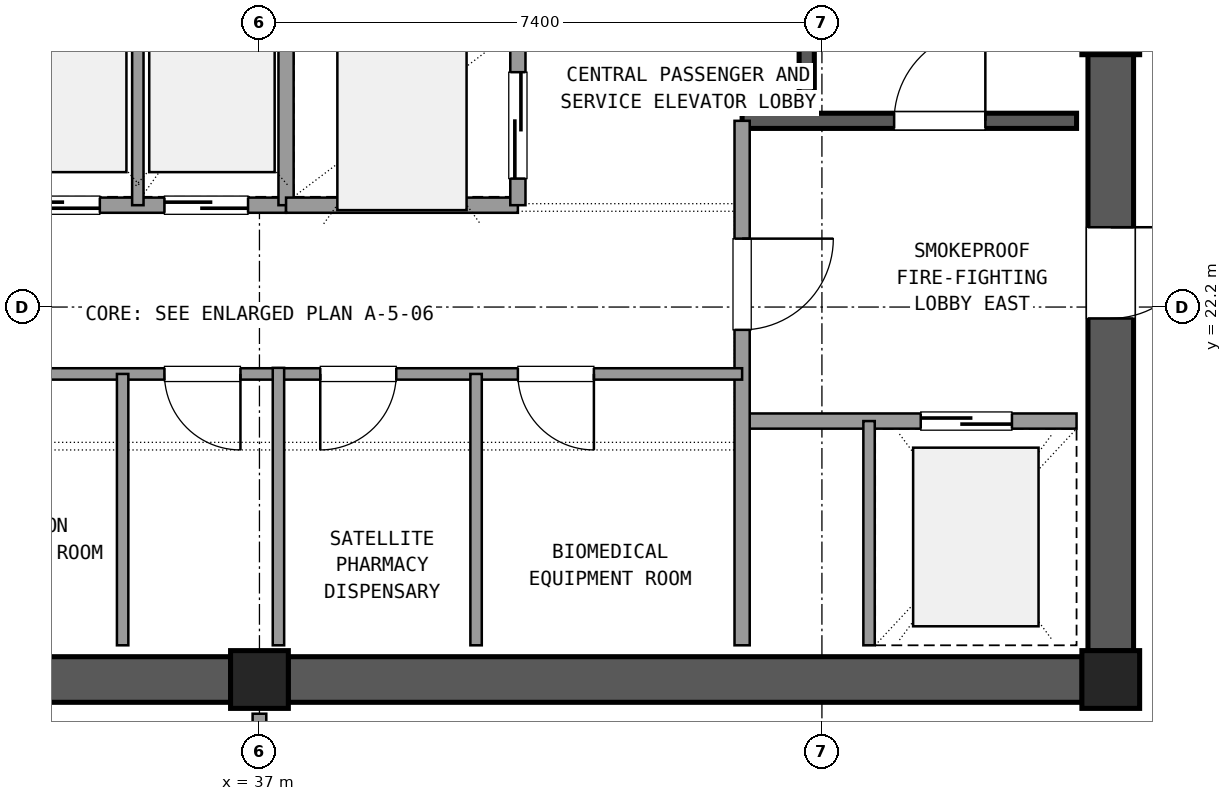
"""IFC4 building model, lengths in metres.
Left out: names, types, materials, properties, quantities, classifications, styles, units other than length and angle.
Written with IfcOpenShell. Run it as: python <this file> out.ifc"""

import sys

from ifc_helpers import new_model, si_unit, direction, frame, frame_2d, origin, origin_2d, place, context, subcontext, project, spatial, rectangle, extrude, element, fill, save


model = new_model("IFC4")
c1 = context("Model", 3, precision=1e-05, world=origin(), true_north=direction((0.0, 1.0)))
c2 = subcontext(c1, "Body", "Model", "MODEL_VIEW")
j1 = project(units=[si_unit("LENGTHUNIT", "METRE"), si_unit("PLANEANGLEUNIT", "RADIAN")], contexts=[c1])
p1 = place(None, origin())
s1 = spatial("IfcSite", under=j1, at=p1, CompositionType="ELEMENT")
p2 = place(p1, origin())
s2 = spatial("IfcBuilding", under=s1, at=p2, CompositionType="ELEMENT")
p3 = place(p2, frame((0.0, 0.0, 257.22)))
s3 = spatial("IfcBuildingStorey", under=s2, at=p3, CompositionType="ELEMENT", Elevation=257.22)
for number, where, z_axis, x_axis in (
    (1, (37.0, 17.3, 0.0), (0.0, 0.0, 1.0), (1.0, 0.0, 0.0)),
    (2, (48.2, 17.3, 0.0), (0.0, 0.0, 1.0), (1.0, 0.0, 0.0)),
    (3, (48.2, 25.9, 0.0), (0.0, 0.0, 1.0), (1.0, 0.0, 0.0)),
):
    element("IfcColumn", number, at=place(p3, frame(where, z_axis=z_axis, x_axis=x_axis)), inside=s3, PredefinedType="COLUMN", context=c2, shape_type="SweptSolid", body=[
        extrude(rectangle(XDim=0.76, YDim=0.76, at=origin_2d()), origin(), (0.0, 0.0, 1.0), 3.6),
    ])
for number, where, z_axis, x_axis in (
    (4, (26.175, 17.3, 0.0), (0.0, 0.0, 1.0), (1.0, 0.0, 0.0)),
    (5, (37.375, 17.3, 0.0), (0.0, 0.0, 1.0), (1.0, 0.0, 0.0)),
):
    element("IfcWall", number, at=place(p3, frame(where, z_axis=z_axis, x_axis=x_axis)), inside=s3, PredefinedType="SHEAR", context=c2, shape_type="SweptSolid", body=[
        extrude(rectangle(XDim=10.45, YDim=0.6, at=frame_2d((5.225, 0.0))), origin(), (0.0, 0.0, 1.0), 3.32),
    ])
p4 = place(p3, frame((48.2, 17.675, 0.0), z_axis=(0.0, 0.0, 1.0), x_axis=(0.0, 1.0, 0.0)))
e6 = element("IfcWall", 6, at=p4, inside=s3, PredefinedType="SHEAR", context=c2, shape_type="SweptSolid", body=[
    extrude(rectangle(XDim=7.85, YDim=0.6, at=frame_2d((3.925, 0.0))), origin(), (0.0, 0.0, 1.0), 3.32),
])
p5 = place(p4, frame((4.375, 0.0, 0.0)))
e7 = element("IfcOpeningElement", 7, at=p5, cuts=e6, PredefinedType="OPENING", context=c2, shape_type="SweptSolid", body=[
    extrude(rectangle(XDim=1.2, YDim=2.15, at=frame_2d((0.6, 1.075))), frame((0.0, 0.31, 0.0), z_axis=(0.0, -1.0, 0.0), x_axis=(1.0, 0.0, 0.0)), (0.0, 0.0, 1.0), 0.62),
])
p6 = place(p3, frame((44.2, 24.65, 0.0), z_axis=(0.0, 0.0, 1.0), x_axis=(0.0, 1.0, 0.0)))
e8 = element("IfcWall", 8, at=p6, inside=s3, PredefinedType="SHEAR", context=c2, shape_type="SweptSolid", body=[
    extrude(rectangle(XDim=9.4, YDim=0.2, at=frame_2d((4.7, 0.0))), origin(), (0.0, 0.0, 1.0), 3.32),
])
p7 = place(p3, frame((43.35, 24.65, 0.0), z_axis=(0.0, 0.0, 1.0), x_axis=(1.0, 0.0, 0.0)))
e9 = element("IfcWall", 9, at=p7, inside=s3, PredefinedType="SHEAR", context=c2, shape_type="SweptSolid", body=[
    extrude(rectangle(XDim=4.4, YDim=0.2, at=frame_2d((2.2, 0.0))), origin(), (0.0, 0.0, 1.0), 3.32),
])
p8 = place(p7, frame((2.0, 0.0, 0.0)))
e10 = element("IfcOpeningElement", 10, at=p8, cuts=e9, PredefinedType="OPENING", context=c2, shape_type="SweptSolid", body=[
    extrude(rectangle(XDim=1.2, YDim=2.15, at=frame_2d((0.6, 1.075))), frame((0.0, 0.11, 0.0), z_axis=(0.0, -1.0, 0.0), x_axis=(1.0, 0.0, 0.0)), (0.0, 0.0, 1.0), 0.22),
])
p9 = place(p3, frame((43.35, 20.7, 0.0), z_axis=(0.0, 0.0, 1.0), x_axis=(1.0, 0.0, 0.0)))
e11 = element("IfcWall", 11, at=p9, inside=s3, PredefinedType="SOLIDWALL", context=c2, shape_type="SweptSolid", body=[
    extrude(rectangle(XDim=4.4, YDim=0.2, at=frame_2d((2.2, 0.0))), origin(), (0.0, 0.0, 1.0), 2.61),
])
p10 = place(p9, frame((2.35, 0.0, 0.0)))
e12 = element("IfcOpeningElement", 12, at=p10, cuts=e11, PredefinedType="OPENING", context=c2, shape_type="SweptSolid", body=[
    extrude(rectangle(XDim=1.2, YDim=2.15, at=frame_2d((0.6, 1.075))), frame((0.0, 0.11, 0.0), z_axis=(0.0, -1.0, 0.0), x_axis=(1.0, 0.0, 0.0)), (0.0, 0.0, 1.0), 0.22),
])
p11 = place(p3, frame((43.35, 17.75, 0.0), z_axis=(0.0, 0.0, 1.0), x_axis=(0.0, 1.0, 0.0)))
e13 = element("IfcWall", 13, at=p11, inside=s3, PredefinedType="SOLIDWALL", context=c2, shape_type="SweptSolid", body=[
    extrude(rectangle(XDim=6.9, YDim=0.2, at=frame_2d((3.45, 0.0))), origin(), (0.0, 0.0, 1.0), 2.61),
])
p12 = place(p11, frame((4.15, 0.0, 0.0)))
e14 = element("IfcOpeningElement", 14, at=p12, cuts=e13, PredefinedType="OPENING", context=c2, shape_type="SweptSolid", body=[
    extrude(rectangle(XDim=1.2, YDim=2.15, at=frame_2d((0.6, 1.075))), frame((0.0, 0.11, 0.0), z_axis=(0.0, -1.0, 0.0), x_axis=(1.0, 0.0, 0.0)), (0.0, 0.0, 1.0), 0.22),
])
p13 = place(p3, frame((45.02, 17.75, 0.0), z_axis=(0.0, 0.0, 1.0), x_axis=(0.0, 1.0, 0.0)))
e15 = element("IfcWall", 15, at=p13, inside=s3, PredefinedType="PARTITIONING", context=c2, shape_type="SweptSolid", body=[
    extrude(rectangle(XDim=2.95, YDim=0.15, at=frame_2d((1.475, 0.0))), origin(), (0.0, 0.0, 1.0), 2.61),
])
p14 = place(p3, frame((30.25, 21.32, 0.0), z_axis=(0.0, 0.0, 1.0), x_axis=(1.0, 0.0, 0.0)))
e16 = element("IfcWall", 16, at=p14, inside=s3, PredefinedType="PARTITIONING", context=c2, shape_type="SweptSolid", body=[
    extrude(rectangle(XDim=7.0, YDim=0.15, at=frame_2d((3.5, 0.0))), origin(), (0.0, 0.0, 1.0), 2.61),
])
p15 = place(p14, frame((0.7, 0.0, 0.0)))
e17 = element("IfcOpeningElement", 17, at=p15, cuts=e16, PredefinedType="OPENING", context=c2, shape_type="SweptSolid", body=[
    extrude(rectangle(XDim=1.0, YDim=2.15, at=frame_2d((0.5, 1.075))), frame((0.0, 0.085, 0.0), z_axis=(0.0, -1.0, 0.0), x_axis=(1.0, 0.0, 0.0)), (0.0, 0.0, 1.0), 0.17),
])
p16 = place(p14, frame((5.5, 0.0, 0.0)))
e18 = element("IfcOpeningElement", 18, at=p16, cuts=e16, PredefinedType="OPENING", context=c2, shape_type="SweptSolid", body=[
    extrude(rectangle(XDim=1.0, YDim=2.15, at=frame_2d((0.5, 1.075))), frame((0.0, 0.085, 0.0), z_axis=(0.0, -1.0, 0.0), x_axis=(1.0, 0.0, 0.0)), (0.0, 0.0, 1.0), 0.17),
])
p17 = place(p3, frame((35.2, 17.75, 0.0), z_axis=(0.0, 0.0, 1.0), x_axis=(0.0, 1.0, 0.0)))
e19 = element("IfcWall", 19, at=p17, inside=s3, PredefinedType="PARTITIONING", context=c2, shape_type="SweptSolid", body=[
    extrude(rectangle(XDim=3.57, YDim=0.15, at=frame_2d((1.785, 0.0))), origin(), (0.0, 0.0, 1.0), 2.61),
])
p18 = place(p3, frame((37.25, 21.32, 0.0), z_axis=(0.0, 0.0, 1.0), x_axis=(1.0, 0.0, 0.0)))
e20 = element("IfcWall", 20, at=p18, inside=s3, PredefinedType="PARTITIONING", context=c2, shape_type="SweptSolid", body=[
    extrude(rectangle(XDim=6.1, YDim=0.15, at=frame_2d((3.05, 0.0))), origin(), (0.0, 0.0, 1.0), 2.61),
])
p19 = place(p18, frame((0.55, 0.0, 0.0)))
e21 = element("IfcOpeningElement", 21, at=p19, cuts=e20, PredefinedType="OPENING", context=c2, shape_type="SweptSolid", body=[
    extrude(rectangle(XDim=1.0, YDim=2.15, at=frame_2d((0.5, 1.075))), frame((0.0, 0.085, 0.0), z_axis=(0.0, -1.0, 0.0), x_axis=(1.0, 0.0, 0.0)), (0.0, 0.0, 1.0), 0.17),
])
p20 = place(p18, frame((3.15, 0.0, 0.0)))
e22 = element("IfcOpeningElement", 22, at=p20, cuts=e20, PredefinedType="OPENING", context=c2, shape_type="SweptSolid", body=[
    extrude(rectangle(XDim=1.0, YDim=2.15, at=frame_2d((0.5, 1.075))), frame((0.0, 0.085, 0.0), z_axis=(0.0, -1.0, 0.0), x_axis=(1.0, 0.0, 0.0)), (0.0, 0.0, 1.0), 0.17),
])
p21 = place(p3, frame((39.85, 17.75, 0.0), z_axis=(0.0, 0.0, 1.0), x_axis=(0.0, 1.0, 0.0)))
e23 = element("IfcWall", 23, at=p21, inside=s3, PredefinedType="PARTITIONING", context=c2, shape_type="SweptSolid", body=[
    extrude(rectangle(XDim=3.57, YDim=0.15, at=frame_2d((1.785, 0.0))), origin(), (0.0, 0.0, 1.0), 2.61),
])
p22 = place(p3, frame((37.25, 17.75, 0.0), z_axis=(0.0, 0.0, 1.0), x_axis=(0.0, 1.0, 0.0)))
e24 = element("IfcWall", 24, at=p22, inside=s3, PredefinedType="PARTITIONING", context=c2, shape_type="SweptSolid", body=[
    extrude(rectangle(XDim=3.65, YDim=0.15, at=frame_2d((1.825, 0.0))), origin(), (0.0, 0.0, 1.0), 2.61),
])
p23 = place(p3, frame((31.45, 23.54, 0.0), z_axis=(0.0, 0.0, 1.0), x_axis=(1.0, 0.0, 0.0)))
e25 = element("IfcWall", 25, at=p23, inside=s3, PredefinedType="SOLIDWALL", context=c2, shape_type="SweptSolid", body=[
    extrude(rectangle(XDim=5.9, YDim=0.2, at=frame_2d((2.95, 0.0))), origin(), (0.0, 0.0, 1.0), 2.61),
])
p24 = place(p23, frame((0.4, 0.0, 0.0)))
e26 = element("IfcOpeningElement", 26, at=p24, cuts=e25, PredefinedType="OPENING", context=c2, shape_type="SweptSolid", body=[
    extrude(rectangle(XDim=1.1, YDim=2.15, at=frame_2d((0.55, 1.075))), frame((0.0, 0.11, 0.0), z_axis=(0.0, -1.0, 0.0), x_axis=(1.0, 0.0, 0.0)), (0.0, 0.0, 1.0), 0.22),
])
p25 = place(p23, frame((2.35, 0.0, 0.0)))
e27 = element("IfcOpeningElement", 27, at=p25, cuts=e25, PredefinedType="OPENING", context=c2, shape_type="SweptSolid", body=[
    extrude(rectangle(XDim=1.1, YDim=2.15, at=frame_2d((0.55, 1.075))), frame((0.0, 0.11, 0.0), z_axis=(0.0, -1.0, 0.0), x_axis=(1.0, 0.0, 0.0)), (0.0, 0.0, 1.0), 0.22),
])
p26 = place(p23, frame((4.3, 0.0, 0.0)))
e28 = element("IfcOpeningElement", 28, at=p26, cuts=e25, PredefinedType="OPENING", context=c2, shape_type="SweptSolid", body=[
    extrude(rectangle(XDim=1.1, YDim=2.15, at=frame_2d((0.55, 1.075))), frame((0.0, 0.11, 0.0), z_axis=(0.0, -1.0, 0.0), x_axis=(1.0, 0.0, 0.0)), (0.0, 0.0, 1.0), 0.22),
])
p27 = place(p3, frame((35.4, 23.54, 0.0), z_axis=(0.0, 0.0, 1.0), x_axis=(0.0, 1.0, 0.0)))
e29 = element("IfcWall", 29, at=p27, inside=s3, PredefinedType="PARTITIONING", context=c2, shape_type="SweptSolid", body=[
    extrude(rectangle(XDim=2.81, YDim=0.15, at=frame_2d((1.405, 0.0))), origin(), (0.0, 0.0, 1.0), 2.61),
])
p28 = place(p3, frame((37.35, 23.54, 0.0), z_axis=(0.0, 0.0, 1.0), x_axis=(0.0, 1.0, 0.0)))
e30 = element("IfcWall", 30, at=p28, inside=s3, PredefinedType="SOLIDWALL", context=c2, shape_type="SweptSolid", body=[
    extrude(rectangle(XDim=6.82, YDim=0.2, at=frame_2d((3.41, 0.0))), origin(), (0.0, 0.0, 1.0), 2.61),
])
p29 = place(p3, frame((37.35, 23.54, 0.0), z_axis=(0.0, 0.0, 1.0), x_axis=(1.0, 0.0, 0.0)))
e31 = element("IfcWall", 31, at=p29, inside=s3, PredefinedType="SOLIDWALL", context=c2, shape_type="SweptSolid", body=[
    extrude(rectangle(XDim=3.05, YDim=0.2, at=frame_2d((1.525, 0.0))), origin(), (0.0, 0.0, 1.0), 2.61),
])
p30 = place(p3, frame((40.4, 23.54, 0.0), z_axis=(0.0, 0.0, 1.0), x_axis=(0.0, 1.0, 0.0)))
e32 = element("IfcWall", 32, at=p30, inside=s3, PredefinedType="SOLIDWALL", context=c2, shape_type="SweptSolid", body=[
    extrude(rectangle(XDim=6.82, YDim=0.2, at=frame_2d((3.41, 0.0))), origin(), (0.0, 0.0, 1.0), 2.61),
])
p31 = place(p30, frame((0.35, 0.0, 0.0)))
e33 = element("IfcOpeningElement", 33, at=p31, cuts=e32, PredefinedType="OPENING", context=c2, shape_type="SweptSolid", body=[
    extrude(rectangle(XDim=1.4, YDim=2.2, at=frame_2d((0.7, 1.1))), frame((0.0, 0.11, 0.0), z_axis=(0.0, -1.0, 0.0), x_axis=(1.0, 0.0, 0.0)), (0.0, 0.0, 1.0), 0.22),
])
p32 = place(p30, frame((2.65, 0.0, 0.0)))
e34 = element("IfcOpeningElement", 34, at=p32, cuts=e32, PredefinedType="OPENING", context=c2, shape_type="SweptSolid", body=[
    extrude(rectangle(XDim=1.4, YDim=2.2, at=frame_2d((0.7, 1.1))), frame((0.0, 0.11, 0.0), z_axis=(0.0, -1.0, 0.0), x_axis=(1.0, 0.0, 0.0)), (0.0, 0.0, 1.0), 0.22),
])
p33 = place(p30, frame((4.85, 0.0, 0.0)))
e35 = element("IfcOpeningElement", 35, at=p33, cuts=e32, PredefinedType="OPENING", context=c2, shape_type="SweptSolid", body=[
    extrude(rectangle(XDim=1.4, YDim=2.2, at=frame_2d((0.7, 1.1))), frame((0.0, 0.11, 0.0), z_axis=(0.0, -1.0, 0.0), x_axis=(1.0, 0.0, 0.0)), (0.0, 0.0, 1.0), 0.22),
])
p34 = place(p3, frame((37.0, 14.15, 0.0), z_axis=(0.0, 0.0, 1.0), x_axis=(0.0, 1.0, 0.0)))
e36 = element("IfcWall", 36, at=p34, inside=s3, PredefinedType="PARTITIONING", context=c2, shape_type="SweptSolid", body=[
    extrude(rectangle(XDim=2.7, YDim=0.18, at=frame_2d((1.35, 0.0))), origin(), (0.0, 0.0, 1.0), 2.61),
])
p35 = place(p34, frame((0.35, 0.0, 0.0)))
e37 = element("IfcOpeningElement", 37, at=p35, cuts=e36, PredefinedType="OPENING", context=c2, shape_type="SweptSolid", body=[
    extrude(rectangle(XDim=2.0, YDim=2.2, at=frame_2d((1.0, 1.1))), frame((0.0, 0.1, 0.0), z_axis=(0.0, -1.0, 0.0), x_axis=(1.0, 0.0, 0.0)), (0.0, 0.0, 1.0), 0.2),
])
p36 = place(p8, origin())
e38 = element("IfcDoor", 38, at=p36, inside=s3, OperationType="SINGLE_SWING_RIGHT", PredefinedType="DOOR", context=c2, shape_type="SweptSolid", body=[
    extrude(rectangle(XDim=1.2, YDim=2.15, at=frame_2d((0.6, 1.075))), frame((0.0, 0.025, 0.0), z_axis=(0.0, -1.0, 0.0), x_axis=(1.0, 0.0, 0.0)), (0.0, 0.0, 1.0), 0.05),
])
fill(e10, e38)
p37 = place(p10, origin())
e39 = element("IfcDoor", 39, at=p37, inside=s3, OperationType="SLIDING_TO_RIGHT", PredefinedType="DOOR", context=c2, shape_type="SweptSolid", body=[
    extrude(rectangle(XDim=1.2, YDim=2.15, at=frame_2d((0.6, 1.075))), frame((0.0, 0.025, 0.0), z_axis=(0.0, -1.0, 0.0), x_axis=(1.0, 0.0, 0.0)), (0.0, 0.0, 1.0), 0.05),
])
fill(e12, e39)
p38 = place(p12, frame((1.2, 0.0, 0.0), z_axis=(0.0, 0.0, 1.0), x_axis=(-1.0, 0.0, 0.0)))
e40 = element("IfcDoor", 40, at=p38, inside=s3, OperationType="SINGLE_SWING_RIGHT", PredefinedType="DOOR", context=c2, shape_type="SweptSolid", body=[
    extrude(rectangle(XDim=1.2, YDim=2.15, at=frame_2d((0.6, 1.075))), frame((0.0, 0.025, 0.0), z_axis=(0.0, -1.0, 0.0), x_axis=(1.0, 0.0, 0.0)), (0.0, 0.0, 1.0), 0.05),
])
fill(e14, e40)
p39 = place(p5, frame((1.2, 0.0, 0.0), z_axis=(0.0, 0.0, 1.0), x_axis=(-1.0, 0.0, 0.0)))
e41 = element("IfcDoor", 41, at=p39, inside=s3, OperationType="SINGLE_SWING_RIGHT", PredefinedType="DOOR", context=c2, shape_type="SweptSolid", body=[
    extrude(rectangle(XDim=1.2, YDim=2.15, at=frame_2d((0.6, 1.075))), frame((0.0, 0.025, 0.0), z_axis=(0.0, -1.0, 0.0), x_axis=(1.0, 0.0, 0.0)), (0.0, 0.0, 1.0), 0.05),
])
fill(e7, e41)
p40 = place(p16, frame((1.0, 0.0, 0.0), z_axis=(0.0, 0.0, 1.0), x_axis=(-1.0, 0.0, 0.0)))
e42 = element("IfcDoor", 42, at=p40, inside=s3, OperationType="SINGLE_SWING_RIGHT", PredefinedType="DOOR", context=c2, shape_type="SweptSolid", body=[
    extrude(rectangle(XDim=1.0, YDim=2.15, at=frame_2d((0.5, 1.075))), frame((0.0, 0.025, 0.0), z_axis=(0.0, -1.0, 0.0), x_axis=(1.0, 0.0, 0.0)), (0.0, 0.0, 1.0), 0.05),
])
fill(e18, e42)
p41 = place(p19, frame((1.0, 0.0, 0.0), z_axis=(0.0, 0.0, 1.0), x_axis=(-1.0, 0.0, 0.0)))
e43 = element("IfcDoor", 43, at=p41, inside=s3, OperationType="SINGLE_SWING_LEFT", PredefinedType="DOOR", context=c2, shape_type="SweptSolid", body=[
    extrude(rectangle(XDim=1.0, YDim=2.15, at=frame_2d((0.5, 1.075))), frame((0.0, 0.025, 0.0), z_axis=(0.0, -1.0, 0.0), x_axis=(1.0, 0.0, 0.0)), (0.0, 0.0, 1.0), 0.05),
])
fill(e21, e43)
p42 = place(p20, frame((1.0, 0.0, 0.0), z_axis=(0.0, 0.0, 1.0), x_axis=(-1.0, 0.0, 0.0)))
e44 = element("IfcDoor", 44, at=p42, inside=s3, OperationType="SINGLE_SWING_RIGHT", PredefinedType="DOOR", context=c2, shape_type="SweptSolid", body=[
    extrude(rectangle(XDim=1.0, YDim=2.15, at=frame_2d((0.5, 1.075))), frame((0.0, 0.025, 0.0), z_axis=(0.0, -1.0, 0.0), x_axis=(1.0, 0.0, 0.0)), (0.0, 0.0, 1.0), 0.05),
])
fill(e22, e44)
p43 = place(p25, origin())
e45 = element("IfcDoor", 45, at=p43, inside=s3, OperationType="SLIDING_TO_RIGHT", PredefinedType="DOOR", context=c2, shape_type="SweptSolid", body=[
    extrude(rectangle(XDim=1.1, YDim=2.15, at=frame_2d((0.55, 1.075))), frame((0.0, 0.025, 0.0), z_axis=(0.0, -1.0, 0.0), x_axis=(1.0, 0.0, 0.0)), (0.0, 0.0, 1.0), 0.05),
])
fill(e27, e45)
p44 = place(p26, origin())
e46 = element("IfcDoor", 46, at=p44, inside=s3, OperationType="SLIDING_TO_RIGHT", PredefinedType="DOOR", context=c2, shape_type="SweptSolid", body=[
    extrude(rectangle(XDim=1.1, YDim=2.15, at=frame_2d((0.55, 1.075))), frame((0.0, 0.025, 0.0), z_axis=(0.0, -1.0, 0.0), x_axis=(1.0, 0.0, 0.0)), (0.0, 0.0, 1.0), 0.05),
])
fill(e28, e46)
p45 = place(p31, origin())
e47 = element("IfcDoor", 47, at=p45, inside=s3, OperationType="SLIDING_TO_LEFT", PredefinedType="DOOR", context=c2, shape_type="SweptSolid", body=[
    extrude(rectangle(XDim=1.4, YDim=2.2, at=frame_2d((0.7, 1.1))), frame((0.0, 0.025, 0.0), z_axis=(0.0, -1.0, 0.0), x_axis=(1.0, 0.0, 0.0)), (0.0, 0.0, 1.0), 0.05),
])
fill(e33, e47)
save(model, sys.argv[1])
